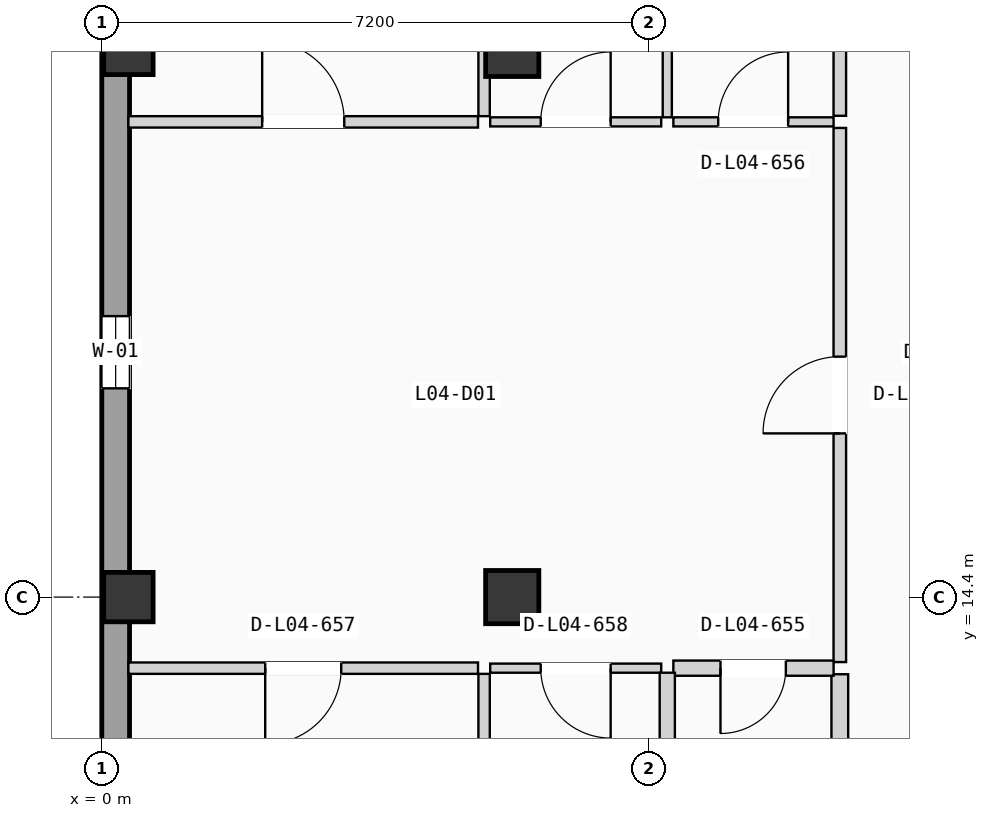
"""IFC4 building model, lengths in metres.
Left out: names, types, materials, properties, quantities, classifications, styles, units other than length and angle.
Written with IfcOpenShell. Run it as: python <this file> out.ifc"""

import sys

from ifc_helpers import new_model, si_unit, direction, frame, frame_2d, origin, origin_2d, place, context, subcontext, project, spatial, rectangle, extrude, element, fill, save


model = new_model("IFC4")
c1 = context("Model", 3, precision=1e-05, world=origin(), true_north=direction((0.0, 1.0)))
c2 = subcontext(c1, "Body", "Model", "MODEL_VIEW")
j1 = project(units=[si_unit("LENGTHUNIT", "METRE"), si_unit("PLANEANGLEUNIT", "RADIAN")], contexts=[c1])
p1 = place(None, origin())
s1 = spatial("IfcSite", under=j1, at=p1, CompositionType="ELEMENT")
p2 = place(p1, origin())
s2 = spatial("IfcBuilding", under=s1, at=p2, CompositionType="ELEMENT")
p3 = place(p2, frame((0.0, 0.0, 15.225)))
s3 = spatial("IfcBuildingStorey", under=s2, at=p3, CompositionType="ELEMENT", Elevation=15.225)
for number, where, z_axis, x_axis in (
    (1, (0.35, 14.4, 0.0), (0.0, 0.0, 1.0), (1.0, 0.0, 0.0)),
    (2, (0.35, 21.6, 0.0), (0.0, 0.0, 1.0), (1.0, 0.0, 0.0)),
):
    element("IfcColumn", number, at=place(p3, frame(where, z_axis=z_axis, x_axis=x_axis)), inside=s3, PredefinedType="COLUMN", context=c2, shape_type="SweptSolid", body=[
        extrude(rectangle(XDim=0.65, YDim=0.65, at=origin_2d()), origin(), (0.0, 0.0, 1.0), 3.15),
    ])
for number, where, z_axis, x_axis in (
    (3, (5.4, 14.4, 0.0), (0.0, 0.0, 1.0), (1.0, 0.0, 0.0)),
    (4, (5.4, 21.6, 0.0), (0.0, 0.0, 1.0), (1.0, 0.0, 0.0)),
):
    element("IfcColumn", number, at=place(p3, frame(where, z_axis=z_axis, x_axis=x_axis)), inside=s3, PredefinedType="COLUMN", context=c2, shape_type="SweptSolid", body=[
        extrude(rectangle(XDim=0.7, YDim=0.7, at=origin_2d()), origin(), (0.0, 0.0, 1.0), 3.15),
    ])
p4 = place(p3, frame((0.183, 0.365, 0.0), z_axis=(0.0, 0.0, 1.0), x_axis=(0.0, 1.0, 0.0)))
e5 = element("IfcWall", 5, at=p4, inside=s3, PredefinedType="SOLIDWALL", context=c2, shape_type="SweptSolid", body=[
    extrude(rectangle(XDim=49.67, YDim=0.365, at=frame_2d((24.835, 0.0))), origin(), (0.0, 0.0, 1.0), 2.89),
])
p5 = place(p4, frame((16.782, 0.0, 0.85)))
e6 = element("IfcOpeningElement", 6, at=p5, cuts=e5, PredefinedType="OPENING", context=c2, shape_type="SweptSolid", body=[
    extrude(rectangle(XDim=0.95, YDim=1.2, at=frame_2d((0.475, 0.6))), frame((0.0, 0.192, 0.0), z_axis=(0.0, -1.0, 0.0), x_axis=(1.0, 0.0, 0.0)), (0.0, 0.0, 1.0), 0.385),
])
p6 = place(p4, frame((9.127, 0.0, 0.9)))
e7 = element("IfcOpeningElement", 7, at=p6, cuts=e5, PredefinedType="OPENING", context=c2, shape_type="SweptSolid", body=[
    extrude(rectangle(XDim=2.0, YDim=1.2, at=frame_2d((1.0, 0.6))), frame((0.0, 0.192, 0.0), z_axis=(0.0, -1.0, 0.0), x_axis=(1.0, 0.0, 0.0)), (0.0, 0.0, 1.0), 0.385),
])
p7 = place(p4, frame((22.829, 0.0, 0.855)))
e8 = element("IfcOpeningElement", 8, at=p7, cuts=e5, PredefinedType="OPENING", context=c2, shape_type="SweptSolid", body=[
    extrude(rectangle(XDim=2.0, YDim=1.35, at=frame_2d((1.0, 0.675))), frame((0.0, 0.192, 0.0), z_axis=(0.0, -1.0, 0.0), x_axis=(1.0, 0.0, 0.0)), (0.0, 0.0, 1.0), 0.385),
])
p8 = place(p4, frame((32.385, 0.0, 0.705)))
e9 = element("IfcOpeningElement", 9, at=p8, cuts=e5, PredefinedType="OPENING", context=c2, shape_type="SweptSolid", body=[
    extrude(rectangle(XDim=2.0, YDim=1.5, at=frame_2d((1.0, 0.75))), frame((0.0, 0.192, 0.0), z_axis=(0.0, -1.0, 0.0), x_axis=(1.0, 0.0, 0.0)), (0.0, 0.0, 1.0), 0.385),
])
p9 = place(p4, frame((28.975, 0.0, 0.555)))
e10 = element("IfcOpeningElement", 10, at=p9, cuts=e5, PredefinedType="OPENING", context=c2, shape_type="SweptSolid", body=[
    extrude(rectangle(XDim=2.0, YDim=1.65, at=frame_2d((1.0, 0.825))), frame((0.0, 0.192, 0.0), z_axis=(0.0, -1.0, 0.0), x_axis=(1.0, 0.0, 0.0)), (0.0, 0.0, 1.0), 0.385),
])
p10 = place(p4, frame((39.504, 0.0, 0.85)))
e11 = element("IfcOpeningElement", 11, at=p10, cuts=e5, PredefinedType="OPENING", context=c2, shape_type="SweptSolid", body=[
    extrude(rectangle(XDim=0.95, YDim=1.2, at=frame_2d((0.475, 0.6))), frame((0.0, 0.192, 0.0), z_axis=(0.0, -1.0, 0.0), x_axis=(1.0, 0.0, 0.0)), (0.0, 0.0, 1.0), 0.385),
])
p11 = place(p3, frame((9.71, 13.545, 0.0), z_axis=(0.0, 0.0, 1.0), x_axis=(0.0, 1.0, 0.0)))
e12 = element("IfcWall", 12, at=p11, inside=s3, PredefinedType="PARTITIONING", context=c2, shape_type="SweptSolid", body=[
    extrude(rectangle(XDim=7.028, YDim=0.165, at=frame_2d((3.514, 0.0))), origin(), (0.0, 0.0, 1.0), 2.87),
])
p12 = place(p11, frame((3.009, 0.0, 0.0)))
e13 = element("IfcOpeningElement", 13, at=p12, cuts=e12, PredefinedType="OPENING", context=c2, shape_type="SweptSolid", body=[
    extrude(rectangle(XDim=1.01, YDim=2.11, at=frame_2d((0.505, 1.055))), frame((0.0, 0.093, 0.0), z_axis=(0.0, -1.0, 0.0), x_axis=(1.0, 0.0, 0.0)), (0.0, 0.0, 1.0), 0.185),
])
p13 = place(p3, frame((9.71, 7.6, 0.0), z_axis=(0.0, 0.0, 1.0), x_axis=(0.0, 1.0, 0.0)))
e14 = element("IfcWall", 14, at=p13, inside=s3, PredefinedType="PLUMBINGWALL", context=c2, shape_type="SweptSolid", body=[
    extrude(rectangle(XDim=5.785, YDim=0.22, at=frame_2d((2.893, 0.0))), origin(), (0.0, 0.0, 1.0), 2.87),
])
p14 = place(p3, frame((9.71, 20.733, 0.0), z_axis=(0.0, 0.0, 1.0), x_axis=(0.0, 1.0, 0.0)))
e15 = element("IfcWall", 15, at=p14, inside=s3, PredefinedType="PARTITIONING", context=c2, shape_type="SweptSolid", body=[
    extrude(rectangle(XDim=5.785, YDim=0.165, at=frame_2d((2.893, 0.0))), origin(), (0.0, 0.0, 1.0), 2.87),
])
p15 = place(p3, frame((7.52, 13.465, 0.0), z_axis=(0.0, 0.0, 1.0), x_axis=(1.0, 0.0, 0.0)))
e16 = element("IfcWall", 16, at=p15, inside=s3, PredefinedType="PLUMBINGWALL", context=c2, shape_type="SweptSolid", body=[
    extrude(rectangle(XDim=2.108, YDim=0.2, at=frame_2d((1.054, 0.0))), origin(), (0.0, 0.0, 1.0), 2.87),
])
p16 = place(p15, frame((0.62, 0.0, 0.0)))
e17 = element("IfcOpeningElement", 17, at=p16, cuts=e16, PredefinedType="OPENING", context=c2, shape_type="SweptSolid", body=[
    extrude(rectangle(XDim=0.86, YDim=2.0, at=frame_2d((0.43, 1.0))), frame((0.0, 0.11, 0.0), z_axis=(0.0, -1.0, 0.0), x_axis=(1.0, 0.0, 0.0)), (0.0, 0.0, 1.0), 0.22),
])
p17 = place(p3, frame((7.52, 20.653, 0.0), z_axis=(0.0, 0.0, 1.0), x_axis=(1.0, 0.0, 0.0)))
e18 = element("IfcWall", 18, at=p17, inside=s3, PredefinedType="PARTITIONING", context=c2, shape_type="SweptSolid", body=[
    extrude(rectangle(XDim=2.108, YDim=0.12, at=frame_2d((1.054, 0.0))), origin(), (0.0, 0.0, 1.0), 2.87),
])
p18 = place(p17, frame((0.59, 0.0, 0.0)))
e19 = element("IfcOpeningElement", 19, at=p18, cuts=e18, PredefinedType="OPENING", context=c2, shape_type="SweptSolid", body=[
    extrude(rectangle(XDim=0.92, YDim=2.02, at=frame_2d((0.46, 1.01))), frame((0.0, 0.07, 0.0), z_axis=(0.0, -1.0, 0.0), x_axis=(1.0, 0.0, 0.0)), (0.0, 0.0, 1.0), 0.14),
])
p19 = place(p3, frame((0.35, 13.465, 0.0), z_axis=(0.0, 0.0, 1.0), x_axis=(1.0, 0.0, 0.0)))
e20 = element("IfcWall", 20, at=p19, inside=s3, PredefinedType="PARTITIONING", context=c2, shape_type="SweptSolid", body=[
    extrude(rectangle(XDim=4.6, YDim=0.15, at=frame_2d((2.3, 0.0))), origin(), (0.0, 0.0, 1.0), 2.87),
])
p20 = place(p19, frame((1.8, 0.0, 0.0)))
e21 = element("IfcOpeningElement", 21, at=p20, cuts=e20, PredefinedType="OPENING", context=c2, shape_type="SweptSolid", body=[
    extrude(rectangle(XDim=1.0, YDim=2.06, at=frame_2d((0.5, 1.03))), frame((0.0, 0.085, 0.0), z_axis=(0.0, -1.0, 0.0), x_axis=(1.0, 0.0, 0.0)), (0.0, 0.0, 1.0), 0.17),
])
p21 = place(p3, frame((5.11, 13.465, 0.0), z_axis=(0.0, 0.0, 1.0), x_axis=(1.0, 0.0, 0.0)))
e22 = element("IfcWall", 22, at=p21, inside=s3, PredefinedType="PARTITIONING", context=c2, shape_type="SweptSolid", body=[
    extrude(rectangle(XDim=2.25, YDim=0.12, at=frame_2d((1.125, 0.0))), origin(), (0.0, 0.0, 1.0), 2.87),
])
p22 = place(p21, frame((0.665, 0.0, 0.0)))
e23 = element("IfcOpeningElement", 23, at=p22, cuts=e22, PredefinedType="OPENING", context=c2, shape_type="SweptSolid", body=[
    extrude(rectangle(XDim=0.92, YDim=2.02, at=frame_2d((0.46, 1.01))), frame((0.0, 0.07, 0.0), z_axis=(0.0, -1.0, 0.0), x_axis=(1.0, 0.0, 0.0)), (0.0, 0.0, 1.0), 0.14),
])
p23 = place(p3, frame((0.35, 20.653, 0.0), z_axis=(0.0, 0.0, 1.0), x_axis=(1.0, 0.0, 0.0)))
e24 = element("IfcWall", 24, at=p23, inside=s3, PredefinedType="PARTITIONING", context=c2, shape_type="SweptSolid", body=[
    extrude(rectangle(XDim=4.6, YDim=0.15, at=frame_2d((2.3, 0.0))), origin(), (0.0, 0.0, 1.0), 2.87),
])
p24 = place(p23, frame((1.76, 0.0, 0.0)))
e25 = element("IfcOpeningElement", 25, at=p24, cuts=e24, PredefinedType="OPENING", context=c2, shape_type="SweptSolid", body=[
    extrude(rectangle(XDim=1.08, YDim=2.1, at=frame_2d((0.54, 1.05))), frame((0.0, 0.085, 0.0), z_axis=(0.0, -1.0, 0.0), x_axis=(1.0, 0.0, 0.0)), (0.0, 0.0, 1.0), 0.17),
])
p25 = place(p3, frame((5.11, 20.653, 0.0), z_axis=(0.0, 0.0, 1.0), x_axis=(1.0, 0.0, 0.0)))
e26 = element("IfcWall", 26, at=p25, inside=s3, PredefinedType="PARTITIONING", context=c2, shape_type="SweptSolid", body=[
    extrude(rectangle(XDim=2.25, YDim=0.12, at=frame_2d((1.125, 0.0))), origin(), (0.0, 0.0, 1.0), 2.87),
])
p26 = place(p25, frame((0.665, 0.0, 0.0)))
e27 = element("IfcOpeningElement", 27, at=p26, cuts=e26, PredefinedType="OPENING", context=c2, shape_type="SweptSolid", body=[
    extrude(rectangle(XDim=0.92, YDim=2.02, at=frame_2d((0.46, 1.01))), frame((0.0, 0.07, 0.0), z_axis=(0.0, -1.0, 0.0), x_axis=(1.0, 0.0, 0.0)), (0.0, 0.0, 1.0), 0.14),
])
p27 = place(p3, frame((7.44, 7.6, 0.0), z_axis=(0.0, 0.0, 1.0), x_axis=(0.0, 1.0, 0.0)))
e28 = element("IfcWall", 28, at=p27, inside=s3, PredefinedType="PLUMBINGWALL", context=c2, shape_type="SweptSolid", body=[
    extrude(rectangle(XDim=5.805, YDim=0.2, at=frame_2d((2.902, 0.0))), origin(), (0.0, 0.0, 1.0), 2.87),
])
p28 = place(p27, frame((2.468, 0.0, 0.0)))
e29 = element("IfcOpeningElement", 29, at=p28, cuts=e28, PredefinedType="OPENING", context=c2, shape_type="SweptSolid", body=[
    extrude(rectangle(XDim=0.85, YDim=2.01, at=frame_2d((0.425, 1.005))), frame((0.0, 0.11, 0.0), z_axis=(0.0, -1.0, 0.0), x_axis=(1.0, 0.0, 0.0)), (0.0, 0.0, 1.0), 0.22),
])
p29 = place(p3, frame((7.44, 20.713, 0.0), z_axis=(0.0, 0.0, 1.0), x_axis=(0.0, 1.0, 0.0)))
e30 = element("IfcWall", 30, at=p29, inside=s3, PredefinedType="PARTITIONING", context=c2, shape_type="SweptSolid", body=[
    extrude(rectangle(XDim=5.805, YDim=0.12, at=frame_2d((2.903, 0.0))), origin(), (0.0, 0.0, 1.0), 2.87),
])
p30 = place(p3, frame((5.03, 7.6, 0.0), z_axis=(0.0, 0.0, 1.0), x_axis=(0.0, 1.0, 0.0)))
e31 = element("IfcWall", 31, at=p30, inside=s3, PredefinedType="PARTITIONING", context=c2, shape_type="SweptSolid", body=[
    extrude(rectangle(XDim=5.79, YDim=0.15, at=frame_2d((2.895, 0.0))), origin(), (0.0, 0.0, 1.0), 2.87),
])
p31 = place(p3, frame((5.03, 20.728, 0.0), z_axis=(0.0, 0.0, 1.0), x_axis=(0.0, 1.0, 0.0)))
e32 = element("IfcWall", 32, at=p31, inside=s3, PredefinedType="PARTITIONING", context=c2, shape_type="SweptSolid", body=[
    extrude(rectangle(XDim=5.79, YDim=0.15, at=frame_2d((2.895, 0.0))), origin(), (0.0, 0.0, 1.0), 2.87),
])
p32 = place(p5, origin())
e33 = element("IfcWindow", 33, at=p32, inside=s3, PartitioningType="SINGLE_PANEL", PredefinedType="WINDOW", context=c2, shape_type="SweptSolid", body=[
    extrude(rectangle(XDim=0.95, YDim=1.2, at=frame_2d((0.475, 0.6))), frame((0.0, 0.03, 0.0), z_axis=(0.0, -1.0, 0.0), x_axis=(1.0, 0.0, 0.0)), (0.0, 0.0, 1.0), 0.06),
])
fill(e6, e33)
p33 = place(p12, origin())
e34 = element("IfcDoor", 34, at=p33, inside=s3, OperationType="SINGLE_SWING_LEFT", PredefinedType="DOOR", context=c2, shape_type="SweptSolid", body=[
    extrude(rectangle(XDim=1.01, YDim=2.11, at=frame_2d((0.505, 1.055))), frame((0.0, 0.025, 0.0), z_axis=(0.0, -1.0, 0.0), x_axis=(1.0, 0.0, 0.0)), (0.0, 0.0, 1.0), 0.05),
])
fill(e13, e34)
p34 = place(p16, frame((0.86, 0.0, 0.0), z_axis=(0.0, 0.0, 1.0), x_axis=(-1.0, 0.0, 0.0)))
e35 = element("IfcDoor", 35, at=p34, inside=s3, OperationType="SINGLE_SWING_LEFT", PredefinedType="DOOR", context=c2, shape_type="SweptSolid", body=[
    extrude(rectangle(XDim=0.86, YDim=2.0, at=frame_2d((0.43, 1.0))), frame((0.0, 0.025, 0.0), z_axis=(0.0, -1.0, 0.0), x_axis=(1.0, 0.0, 0.0)), (0.0, 0.0, 1.0), 0.05),
])
fill(e17, e35)
p35 = place(p18, origin())
e36 = element("IfcDoor", 36, at=p35, inside=s3, OperationType="SINGLE_SWING_RIGHT", PredefinedType="DOOR", context=c2, shape_type="SweptSolid", body=[
    extrude(rectangle(XDim=0.92, YDim=2.02, at=frame_2d((0.46, 1.01))), frame((0.0, 0.025, 0.0), z_axis=(0.0, -1.0, 0.0), x_axis=(1.0, 0.0, 0.0)), (0.0, 0.0, 1.0), 0.05),
])
fill(e19, e36)
p36 = place(p20, frame((1.0, 0.0, 0.0), z_axis=(0.0, 0.0, 1.0), x_axis=(-1.0, 0.0, 0.0)))
e37 = element("IfcDoor", 37, at=p36, inside=s3, OperationType="SINGLE_SWING_LEFT", PredefinedType="DOOR", context=c2, shape_type="SweptSolid", body=[
    extrude(rectangle(XDim=1.0, YDim=2.06, at=frame_2d((0.5, 1.03))), frame((0.0, 0.025, 0.0), z_axis=(0.0, -1.0, 0.0), x_axis=(1.0, 0.0, 0.0)), (0.0, 0.0, 1.0), 0.05),
])
fill(e21, e37)
p37 = place(p22, frame((0.92, 0.0, 0.0), z_axis=(0.0, 0.0, 1.0), x_axis=(-1.0, 0.0, 0.0)))
e38 = element("IfcDoor", 38, at=p37, inside=s3, OperationType="SINGLE_SWING_RIGHT", PredefinedType="DOOR", context=c2, shape_type="SweptSolid", body=[
    extrude(rectangle(XDim=0.92, YDim=2.02, at=frame_2d((0.46, 1.01))), frame((0.0, 0.025, 0.0), z_axis=(0.0, -1.0, 0.0), x_axis=(1.0, 0.0, 0.0)), (0.0, 0.0, 1.0), 0.05),
])
fill(e23, e38)
p38 = place(p24, origin())
e39 = element("IfcDoor", 39, at=p38, inside=s3, OperationType="SINGLE_SWING_LEFT", PredefinedType="DOOR", context=c2, shape_type="SweptSolid", body=[
    extrude(rectangle(XDim=1.08, YDim=2.1, at=frame_2d((0.54, 1.05))), frame((0.0, 0.025, 0.0), z_axis=(0.0, -1.0, 0.0), x_axis=(1.0, 0.0, 0.0)), (0.0, 0.0, 1.0), 0.05),
])
fill(e25, e39)
p39 = place(p26, origin())
e40 = element("IfcDoor", 40, at=p39, inside=s3, OperationType="SINGLE_SWING_RIGHT", PredefinedType="DOOR", context=c2, shape_type="SweptSolid", body=[
    extrude(rectangle(XDim=0.92, YDim=2.02, at=frame_2d((0.46, 1.01))), frame((0.0, 0.025, 0.0), z_axis=(0.0, -1.0, 0.0), x_axis=(1.0, 0.0, 0.0)), (0.0, 0.0, 1.0), 0.05),
])
fill(e27, e40)
save(model, sys.argv[1])
